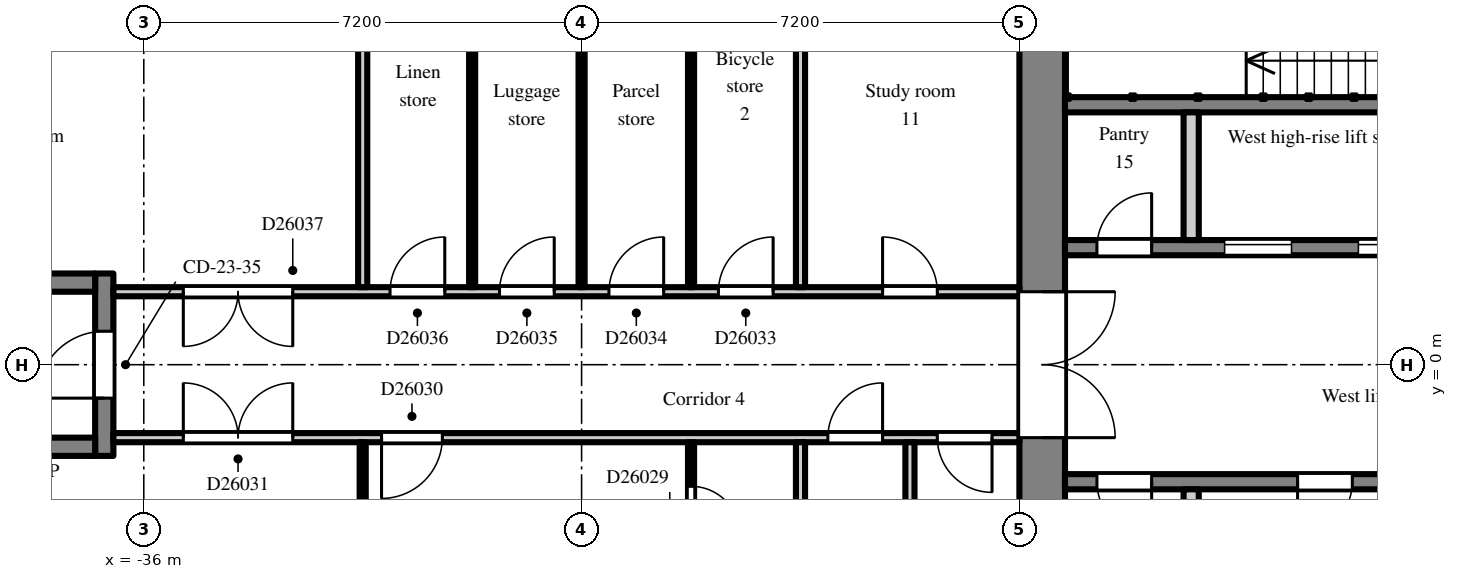
"""IFC4 building model, lengths in metres.
Left out: names, types, materials, properties, quantities, classifications, styles, units other than length and angle.
Written with IfcOpenShell. Run it as: python <this file> out.ifc"""

import sys

from ifc_helpers import new_model, si_unit, direction, frame, frame_2d, origin, place, context, subcontext, project, spatial, rectangle, extrude, element, fill, save


model = new_model("IFC4")
c1 = context("Model", 3, precision=1e-05, world=origin(), true_north=direction((0.0, 1.0)))
c2 = subcontext(c1, "Body", "Model", "MODEL_VIEW")
j1 = project(units=[si_unit("LENGTHUNIT", "METRE"), si_unit("PLANEANGLEUNIT", "RADIAN")], contexts=[c1])
p1 = place(None, origin())
s1 = spatial("IfcSite", under=j1, at=p1, CompositionType="ELEMENT")
p2 = place(p1, origin())
s2 = spatial("IfcBuilding", under=s1, at=p2, CompositionType="ELEMENT")
p3 = place(p2, frame((0.0, 0.0, 179.7)))
s3 = spatial("IfcBuildingStorey", under=s2, at=p3, CompositionType="ELEMENT", Elevation=179.7)
p4 = place(p3, frame((-21.225, -7.2, 0.0), z_axis=(0.0, 0.0, 1.0), x_axis=(0.0, 1.0, 0.0)))
e1 = element("IfcWall", 1, at=p4, inside=s3, PredefinedType="SHEAR", context=c2, shape_type="SweptSolid", body=[
    extrude(rectangle(XDim=14.4, YDim=0.75, at=frame_2d((7.2, 0.0))), origin(), (0.0, 0.0, 1.0), 2.6),
])
p5 = place(p4, frame((6.0, 0.0, 0.0)))
e2 = element("IfcOpeningElement", 2, at=p5, cuts=e1, PredefinedType="OPENING", context=c2, shape_type="SweptSolid", body=[
    extrude(rectangle(XDim=2.4, YDim=2.2, at=frame_2d((1.2, 1.1))), frame((0.0, 0.385, 0.0), z_axis=(0.0, -1.0, 0.0), x_axis=(1.0, 0.0, 0.0)), (0.0, 0.0, 1.0), 0.77),
])
p6 = place(p3, frame((-7.9, 1.925, 0.0), z_axis=(0.0, 0.0, 1.0), x_axis=(-1.0, 0.0, 0.0)))
e3 = element("IfcWall", 3, at=p6, inside=s3, PredefinedType="SHEAR", context=c2, shape_type="SweptSolid", body=[
    extrude(rectangle(XDim=12.95, YDim=0.25, at=frame_2d((6.475, 0.0))), origin(), (0.0, 0.0, 1.0), 2.6),
])
p7 = place(p6, frame((4.825, 0.0, 0.0)))
e4 = element("IfcOpeningElement", 4, at=p7, cuts=e3, PredefinedType="OPENING", context=c2, shape_type="SweptSolid", body=[
    extrude(rectangle(XDim=1.1, YDim=2.1, at=frame_2d((0.55, 1.05))), frame((0.0, 0.135, 0.0), z_axis=(0.0, -1.0, 0.0), x_axis=(1.0, 0.0, 0.0)), (0.0, 0.0, 1.0), 0.27),
])
p8 = place(p6, frame((7.025, 0.0, 0.0)))
e5 = element("IfcOpeningElement", 5, at=p8, cuts=e3, PredefinedType="OPENING", context=c2, shape_type="SweptSolid", body=[
    extrude(rectangle(XDim=1.1, YDim=2.1, at=frame_2d((0.55, 1.05))), frame((0.0, 0.135, 0.0), z_axis=(0.0, -1.0, 0.0), x_axis=(1.0, 0.0, 0.0)), (0.0, 0.0, 1.0), 0.27),
])
p9 = place(p6, frame((9.225, 0.0, 0.0)))
e6 = element("IfcOpeningElement", 6, at=p9, cuts=e3, PredefinedType="OPENING", context=c2, shape_type="SweptSolid", body=[
    extrude(rectangle(XDim=1.1, YDim=2.1, at=frame_2d((0.55, 1.05))), frame((0.0, 0.135, 0.0), z_axis=(0.0, -1.0, 0.0), x_axis=(1.0, 0.0, 0.0)), (0.0, 0.0, 1.0), 0.27),
])
p10 = place(p6, frame((0.525, 0.0, 0.0)))
e7 = element("IfcOpeningElement", 7, at=p10, cuts=e3, PredefinedType="OPENING", context=c2, shape_type="SweptSolid", body=[
    extrude(rectangle(XDim=0.9, YDim=2.1, at=frame_2d((0.45, 1.05))), frame((0.0, 0.135, 0.0), z_axis=(0.0, -1.0, 0.0), x_axis=(1.0, 0.0, 0.0)), (0.0, 0.0, 1.0), 0.27),
])
p11 = place(p6, frame((2.625, 0.0, 0.0)))
e8 = element("IfcOpeningElement", 8, at=p11, cuts=e3, PredefinedType="OPENING", context=c2, shape_type="SweptSolid", body=[
    extrude(rectangle(XDim=1.1, YDim=2.1, at=frame_2d((0.55, 1.05))), frame((0.0, 0.135, 0.0), z_axis=(0.0, -1.0, 0.0), x_axis=(1.0, 0.0, 0.0)), (0.0, 0.0, 1.0), 0.27),
])
p12 = place(p6, frame((11.525, 0.0, 0.0)))
e9 = element("IfcOpeningElement", 9, at=p12, cuts=e3, PredefinedType="OPENING", context=c2, shape_type="SweptSolid", body=[
    extrude(rectangle(XDim=0.9, YDim=2.1, at=frame_2d((0.45, 1.05))), frame((0.0, 0.135, 0.0), z_axis=(0.0, -1.0, 0.0), x_axis=(1.0, 0.0, 0.0)), (0.0, 0.0, 1.0), 0.27),
])
p13 = place(p3, frame((-12.3, 4.275, 0.0), z_axis=(0.0, 0.0, 1.0), x_axis=(-1.0, 0.0, 0.0)))
e10 = element("IfcWall", 10, at=p13, inside=s3, PredefinedType="SHEAR", context=c2, shape_type="SweptSolid", body=[
    extrude(rectangle(XDim=8.55, YDim=0.25, at=frame_2d((4.275, 0.0))), origin(), (0.0, 0.0, 1.0), 2.6),
])
p14 = place(p3, frame((-18.775, 2.05, 0.0), z_axis=(0.0, 0.0, 1.0), x_axis=(0.0, 1.0, 0.0)))
e11 = element("IfcWall", 11, at=p14, inside=s3, PredefinedType="PARTITIONING", context=c2, shape_type="SweptSolid", body=[
    extrude(rectangle(XDim=2.1, YDim=0.25, at=frame_2d((1.05, 0.0))), origin(), (0.0, 0.0, 1.0), 2.6),
])
p15 = place(p3, frame((-7.9, -1.925, 0.0), z_axis=(0.0, 0.0, 1.0), x_axis=(-1.0, 0.0, 0.0)))
e12 = element("IfcWall", 12, at=p15, inside=s3, PredefinedType="SHEAR", context=c2, shape_type="SweptSolid", body=[
    extrude(rectangle(XDim=12.95, YDim=0.25, at=frame_2d((6.475, 0.0))), origin(), (0.0, 0.0, 1.0), 2.6),
])
p16 = place(p15, frame((0.525, 0.0, 0.0)))
e13 = element("IfcOpeningElement", 13, at=p16, cuts=e12, PredefinedType="OPENING", context=c2, shape_type="SweptSolid", body=[
    extrude(rectangle(XDim=0.9, YDim=2.1, at=frame_2d((0.45, 1.05))), frame((0.0, 0.135, 0.0), z_axis=(0.0, -1.0, 0.0), x_axis=(1.0, 0.0, 0.0)), (0.0, 0.0, 1.0), 0.27),
])
p17 = place(p15, frame((2.625, 0.0, 0.0)))
e14 = element("IfcOpeningElement", 14, at=p17, cuts=e12, PredefinedType="OPENING", context=c2, shape_type="SweptSolid", body=[
    extrude(rectangle(XDim=1.1, YDim=2.1, at=frame_2d((0.55, 1.05))), frame((0.0, 0.135, 0.0), z_axis=(0.0, -1.0, 0.0), x_axis=(1.0, 0.0, 0.0)), (0.0, 0.0, 1.0), 0.27),
])
p18 = place(p15, frame((4.925, 0.0, 0.0)))
e15 = element("IfcOpeningElement", 15, at=p18, cuts=e12, PredefinedType="OPENING", context=c2, shape_type="SweptSolid", body=[
    extrude(rectangle(XDim=0.9, YDim=2.1, at=frame_2d((0.45, 1.05))), frame((0.0, 0.135, 0.0), z_axis=(0.0, -1.0, 0.0), x_axis=(1.0, 0.0, 0.0)), (0.0, 0.0, 1.0), 0.27),
])
p19 = place(p15, frame((8.225, 0.0, 0.0)))
e16 = element("IfcOpeningElement", 16, at=p19, cuts=e12, PredefinedType="OPENING", context=c2, shape_type="SweptSolid", body=[
    extrude(rectangle(XDim=0.9, YDim=2.1, at=frame_2d((0.45, 1.05))), frame((0.0, 0.135, 0.0), z_axis=(0.0, -1.0, 0.0), x_axis=(1.0, 0.0, 0.0)), (0.0, 0.0, 1.0), 0.27),
])
p20 = place(p15, frame((11.525, 0.0, 0.0)))
e17 = element("IfcOpeningElement", 17, at=p20, cuts=e12, PredefinedType="OPENING", context=c2, shape_type="SweptSolid", body=[
    extrude(rectangle(XDim=0.9, YDim=2.1, at=frame_2d((0.45, 1.05))), frame((0.0, 0.135, 0.0), z_axis=(0.0, -1.0, 0.0), x_axis=(1.0, 0.0, 0.0)), (0.0, 0.0, 1.0), 0.27),
])
p21 = place(p3, frame((-18.775, -2.05, 0.0), z_axis=(0.0, 0.0, 1.0), x_axis=(0.0, -1.0, 0.0)))
e18 = element("IfcWall", 18, at=p21, inside=s3, PredefinedType="PARTITIONING", context=c2, shape_type="SweptSolid", body=[
    extrude(rectangle(XDim=2.1, YDim=0.25, at=frame_2d((1.05, 0.0))), origin(), (0.0, 0.0, 1.0), 2.6),
])
p22 = place(p3, frame((-36.65, -1.5, 0.0), z_axis=(0.0, 0.0, 1.0), x_axis=(0.0, 1.0, 0.0)))
e19 = element("IfcWall", 19, at=p22, inside=s3, PredefinedType="SHEAR", context=c2, shape_type="SweptSolid", body=[
    extrude(rectangle(XDim=3.0, YDim=0.3, at=frame_2d((1.5, 0.0))), origin(), (0.0, 0.0, 1.0), 2.6),
])
p23 = place(p22, frame((0.95, 0.0, 0.0)))
e20 = element("IfcOpeningElement", 20, at=p23, cuts=e19, PredefinedType="OPENING", context=c2, shape_type="SweptSolid", body=[
    extrude(rectangle(XDim=1.1, YDim=2.1, at=frame_2d((0.55, 1.05))), frame((0.0, 0.16, 0.0), z_axis=(0.0, -1.0, 0.0), x_axis=(1.0, 0.0, 0.0)), (0.0, 0.0, 1.0), 0.32),
])
for number, where, z_axis, x_axis in (
    (21, (-36.8, -1.35, 0.0), (0.0, 0.0, 1.0), (-1.0, 0.0, 0.0)),
    (22, (-36.8, 1.35, 0.0), (0.0, 0.0, 1.0), (-1.0, 0.0, 0.0)),
):
    element("IfcWall", number, at=place(p3, frame(where, z_axis=z_axis, x_axis=x_axis)), inside=s3, PredefinedType="SHEAR", context=c2, shape_type="SweptSolid", body=[
        extrude(rectangle(XDim=5.8, YDim=0.3, at=frame_2d((2.9, 0.0))), origin(), (0.0, 0.0, 1.0), 2.6),
    ])
p24 = place(p3, frame((-36.5, -1.2, 0.0), z_axis=(0.0, 0.0, 1.0), x_axis=(1.0, 0.0, 0.0)))
e23 = element("IfcWall", 23, at=p24, inside=s3, PredefinedType="PARTITIONING", context=c2, shape_type="SweptSolid", body=[
    extrude(rectangle(XDim=14.9, YDim=0.15, at=frame_2d((7.45, 0.0))), origin(), (0.0, 0.0, 1.0), 2.6),
])
p25 = place(p24, frame((13.55, 0.0, 0.0)))
e24 = element("IfcOpeningElement", 24, at=p25, cuts=e23, PredefinedType="OPENING", context=c2, shape_type="SweptSolid", body=[
    extrude(rectangle(XDim=0.9, YDim=2.1, at=frame_2d((0.45, 1.05))), frame((0.0, 0.085, 0.0), z_axis=(0.0, -1.0, 0.0), x_axis=(1.0, 0.0, 0.0)), (0.0, 0.0, 1.0), 0.17),
])
p26 = place(p24, frame((11.75, 0.0, 0.0)))
e25 = element("IfcOpeningElement", 25, at=p26, cuts=e23, PredefinedType="OPENING", context=c2, shape_type="SweptSolid", body=[
    extrude(rectangle(XDim=0.9, YDim=2.1, at=frame_2d((0.45, 1.05))), frame((0.0, 0.085, 0.0), z_axis=(0.0, -1.0, 0.0), x_axis=(1.0, 0.0, 0.0)), (0.0, 0.0, 1.0), 0.17),
])
p27 = place(p24, frame((4.41, 0.0, 0.0)))
e26 = element("IfcOpeningElement", 26, at=p27, cuts=e23, PredefinedType="OPENING", context=c2, shape_type="SweptSolid", body=[
    extrude(rectangle(XDim=1.0, YDim=2.1, at=frame_2d((0.5, 1.05))), frame((0.0, 0.085, 0.0), z_axis=(0.0, -1.0, 0.0), x_axis=(1.0, 0.0, 0.0)), (0.0, 0.0, 1.0), 0.17),
])
p28 = place(p24, frame((1.15, 0.0, 0.0)))
e27 = element("IfcOpeningElement", 27, at=p28, cuts=e23, PredefinedType="OPENING", context=c2, shape_type="SweptSolid", body=[
    extrude(rectangle(XDim=1.8, YDim=2.1, at=frame_2d((0.9, 1.05))), frame((0.0, 0.085, 0.0), z_axis=(0.0, -1.0, 0.0), x_axis=(1.0, 0.0, 0.0)), (0.0, 0.0, 1.0), 0.17),
])
p29 = place(p3, frame((-36.5, 1.2, 0.0), z_axis=(0.0, 0.0, 1.0), x_axis=(1.0, 0.0, 0.0)))
e28 = element("IfcWall", 28, at=p29, inside=s3, PredefinedType="PARTITIONING", context=c2, shape_type="SweptSolid", body=[
    extrude(rectangle(XDim=14.9, YDim=0.15, at=frame_2d((7.45, 0.0))), origin(), (0.0, 0.0, 1.0), 2.6),
])
p30 = place(p29, frame((12.65, 0.0, 0.0)))
e29 = element("IfcOpeningElement", 29, at=p30, cuts=e28, PredefinedType="OPENING", context=c2, shape_type="SweptSolid", body=[
    extrude(rectangle(XDim=0.9, YDim=2.1, at=frame_2d((0.45, 1.05))), frame((0.0, 0.085, 0.0), z_axis=(0.0, -1.0, 0.0), x_axis=(1.0, 0.0, 0.0)), (0.0, 0.0, 1.0), 0.17),
])
p31 = place(p29, frame((9.95, 0.0, 0.0)))
e30 = element("IfcOpeningElement", 30, at=p31, cuts=e28, PredefinedType="OPENING", context=c2, shape_type="SweptSolid", body=[
    extrude(rectangle(XDim=0.9, YDim=2.1, at=frame_2d((0.45, 1.05))), frame((0.0, 0.085, 0.0), z_axis=(0.0, -1.0, 0.0), x_axis=(1.0, 0.0, 0.0)), (0.0, 0.0, 1.0), 0.17),
])
p32 = place(p29, frame((8.15, 0.0, 0.0)))
e31 = element("IfcOpeningElement", 31, at=p32, cuts=e28, PredefinedType="OPENING", context=c2, shape_type="SweptSolid", body=[
    extrude(rectangle(XDim=0.9, YDim=2.1, at=frame_2d((0.45, 1.05))), frame((0.0, 0.085, 0.0), z_axis=(0.0, -1.0, 0.0), x_axis=(1.0, 0.0, 0.0)), (0.0, 0.0, 1.0), 0.17),
])
p33 = place(p29, frame((6.35, 0.0, 0.0)))
e32 = element("IfcOpeningElement", 32, at=p33, cuts=e28, PredefinedType="OPENING", context=c2, shape_type="SweptSolid", body=[
    extrude(rectangle(XDim=0.9, YDim=2.1, at=frame_2d((0.45, 1.05))), frame((0.0, 0.085, 0.0), z_axis=(0.0, -1.0, 0.0), x_axis=(1.0, 0.0, 0.0)), (0.0, 0.0, 1.0), 0.17),
])
p34 = place(p29, frame((4.55, 0.0, 0.0)))
e33 = element("IfcOpeningElement", 33, at=p34, cuts=e28, PredefinedType="OPENING", context=c2, shape_type="SweptSolid", body=[
    extrude(rectangle(XDim=0.9, YDim=2.1, at=frame_2d((0.45, 1.05))), frame((0.0, 0.085, 0.0), z_axis=(0.0, -1.0, 0.0), x_axis=(1.0, 0.0, 0.0)), (0.0, 0.0, 1.0), 0.17),
])
p35 = place(p29, frame((1.15, 0.0, 0.0)))
e34 = element("IfcOpeningElement", 34, at=p35, cuts=e28, PredefinedType="OPENING", context=c2, shape_type="SweptSolid", body=[
    extrude(rectangle(XDim=1.8, YDim=2.1, at=frame_2d((0.9, 1.05))), frame((0.0, 0.085, 0.0), z_axis=(0.0, -1.0, 0.0), x_axis=(1.0, 0.0, 0.0)), (0.0, 0.0, 1.0), 0.17),
])
p36 = place(p3, frame((-32.4, -6.9, 0.0), z_axis=(0.0, 0.0, 1.0), x_axis=(0.0, 1.0, 0.0)))
e35 = element("IfcWall", 35, at=p36, inside=s3, PredefinedType="PARTITIONING", context=c2, shape_type="SweptSolid", body=[
    extrude(rectangle(XDim=5.625, YDim=0.1, at=frame_2d((2.812, 0.0))), origin(), (0.0, 0.0, 1.0), 2.6),
])
p37 = place(p3, frame((-32.4, 1.275, 0.0), z_axis=(0.0, 0.0, 1.0), x_axis=(0.0, 1.0, 0.0)))
e36 = element("IfcWall", 36, at=p37, inside=s3, PredefinedType="PARTITIONING", context=c2, shape_type="SweptSolid", body=[
    extrude(rectangle(XDim=5.625, YDim=0.15, at=frame_2d((2.812, 0.0))), origin(), (0.0, 0.0, 1.0), 2.6),
])
for number, where, z_axis, x_axis in (
    (37, (-30.6, 1.275, 0.0), (0.0, 0.0, 1.0), (0.0, 1.0, 0.0)),
    (38, (-28.8, 1.275, 0.0), (0.0, 0.0, 1.0), (0.0, 1.0, 0.0)),
):
    element("IfcWall", number, at=place(p3, frame(where, z_axis=z_axis, x_axis=x_axis)), inside=s3, PredefinedType="PARTITIONING", context=c2, shape_type="SweptSolid", body=[
        extrude(rectangle(XDim=5.625, YDim=0.1, at=frame_2d((2.812, 0.0))), origin(), (0.0, 0.0, 1.0), 2.6),
    ])
p38 = place(p3, frame((-27.0, -3.65, 0.0), z_axis=(0.0, 0.0, 1.0), x_axis=(0.0, 1.0, 0.0)))
e39 = element("IfcWall", 39, at=p38, inside=s3, PredefinedType="PARTITIONING", context=c2, shape_type="SweptSolid", body=[
    extrude(rectangle(XDim=2.375, YDim=0.1, at=frame_2d((1.188, 0.0))), origin(), (0.0, 0.0, 1.0), 2.6),
])
p39 = place(p38, frame((0.85, 0.0, 0.0)))
e40 = element("IfcOpeningElement", 40, at=p39, cuts=e39, PredefinedType="OPENING", context=c2, shape_type="SweptSolid", body=[
    extrude(rectangle(XDim=0.8, YDim=2.1, at=frame_2d((0.4, 1.05))), frame((0.0, 0.06, 0.0), z_axis=(0.0, -1.0, 0.0), x_axis=(1.0, 0.0, 0.0)), (0.0, 0.0, 1.0), 0.12),
])
p40 = place(p3, frame((-27.0, 1.275, 0.0), z_axis=(0.0, 0.0, 1.0), x_axis=(0.0, 1.0, 0.0)))
e41 = element("IfcWall", 41, at=p40, inside=s3, PredefinedType="PARTITIONING", context=c2, shape_type="SweptSolid", body=[
    extrude(rectangle(XDim=5.625, YDim=0.1, at=frame_2d((2.812, 0.0))), origin(), (0.0, 0.0, 1.0), 2.6),
])
for number, where, z_axis, x_axis in (
    (42, (-25.2, -6.9, 0.0), (0.0, 0.0, 1.0), (0.0, 1.0, 0.0)),
    (43, (-25.2, 1.275, 0.0), (0.0, 0.0, 1.0), (0.0, 1.0, 0.0)),
    (44, (-23.4, -6.9, 0.0), (0.0, 0.0, 1.0), (0.0, 1.0, 0.0)),
):
    element("IfcWall", number, at=place(p3, frame(where, z_axis=z_axis, x_axis=x_axis)), inside=s3, PredefinedType="PARTITIONING", context=c2, shape_type="SweptSolid", body=[
        extrude(rectangle(XDim=5.625, YDim=0.15, at=frame_2d((2.812, 0.0))), origin(), (0.0, 0.0, 1.0), 2.6),
    ])
p41 = place(p8, origin())
e45 = element("IfcDoor", 45, at=p41, inside=s3, OperationType="SLIDING_TO_LEFT", PredefinedType="DOOR", context=c2, shape_type="SweptSolid", body=[
    extrude(rectangle(XDim=1.1, YDim=2.1, at=frame_2d((0.55, 1.05))), frame((0.0, 0.025, 0.0), z_axis=(0.0, -1.0, 0.0), x_axis=(1.0, 0.0, 0.0)), (0.0, 0.0, 1.0), 0.05),
])
fill(e5, e45)
p42 = place(p9, origin())
e46 = element("IfcDoor", 46, at=p42, inside=s3, OperationType="SLIDING_TO_LEFT", PredefinedType="DOOR", context=c2, shape_type="SweptSolid", body=[
    extrude(rectangle(XDim=1.1, YDim=2.1, at=frame_2d((0.55, 1.05))), frame((0.0, 0.025, 0.0), z_axis=(0.0, -1.0, 0.0), x_axis=(1.0, 0.0, 0.0)), (0.0, 0.0, 1.0), 0.05),
])
fill(e6, e46)
p43 = place(p5, frame((2.4, 0.0, 0.0), z_axis=(0.0, 0.0, 1.0), x_axis=(-1.0, 0.0, 0.0)))
e47 = element("IfcDoor", 47, at=p43, inside=s3, OperationType="DOUBLE_DOOR_DOUBLE_SWING", PredefinedType="DOOR", context=c2, shape_type="SweptSolid", body=[
    extrude(rectangle(XDim=2.4, YDim=2.2, at=frame_2d((1.2, 1.1))), frame((0.0, 0.025, 0.0), z_axis=(0.0, -1.0, 0.0), x_axis=(1.0, 0.0, 0.0)), (0.0, 0.0, 1.0), 0.05),
])
fill(e2, e47)
p44 = place(p12, frame((0.9, 0.0, 0.0), z_axis=(0.0, 0.0, 1.0), x_axis=(-1.0, 0.0, 0.0)))
e48 = element("IfcDoor", 48, at=p44, inside=s3, OperationType="SINGLE_SWING_RIGHT", PredefinedType="DOOR", context=c2, shape_type="SweptSolid", body=[
    extrude(rectangle(XDim=0.9, YDim=2.1, at=frame_2d((0.45, 1.05))), frame((0.0, 0.025, 0.0), z_axis=(0.0, -1.0, 0.0), x_axis=(1.0, 0.0, 0.0)), (0.0, 0.0, 1.0), 0.05),
])
fill(e9, e48)
p45 = place(p19, origin())
e49 = element("IfcDoor", 49, at=p45, inside=s3, OperationType="SINGLE_SWING_RIGHT", PredefinedType="DOOR", context=c2, shape_type="SweptSolid", body=[
    extrude(rectangle(XDim=0.9, YDim=2.1, at=frame_2d((0.45, 1.05))), frame((0.0, 0.025, 0.0), z_axis=(0.0, -1.0, 0.0), x_axis=(1.0, 0.0, 0.0)), (0.0, 0.0, 1.0), 0.05),
])
fill(e16, e49)
p46 = place(p20, origin())
e50 = element("IfcDoor", 50, at=p46, inside=s3, OperationType="SINGLE_SWING_LEFT", PredefinedType="DOOR", context=c2, shape_type="SweptSolid", body=[
    extrude(rectangle(XDim=0.9, YDim=2.1, at=frame_2d((0.45, 1.05))), frame((0.0, 0.025, 0.0), z_axis=(0.0, -1.0, 0.0), x_axis=(1.0, 0.0, 0.0)), (0.0, 0.0, 1.0), 0.05),
])
fill(e17, e50)
p47 = place(p23, origin())
e51 = element("IfcDoor", 51, at=p47, inside=s3, OperationType="SINGLE_SWING_LEFT", PredefinedType="DOOR", context=c2, shape_type="SweptSolid", body=[
    extrude(rectangle(XDim=1.1, YDim=2.1, at=frame_2d((0.55, 1.05))), frame((0.0, 0.025, 0.0), z_axis=(0.0, -1.0, 0.0), x_axis=(1.0, 0.0, 0.0)), (0.0, 0.0, 1.0), 0.05),
])
fill(e20, e51)
p48 = place(p25, frame((0.9, 0.0, 0.0), z_axis=(0.0, 0.0, 1.0), x_axis=(-1.0, 0.0, 0.0)))
e52 = element("IfcDoor", 52, at=p48, inside=s3, OperationType="SINGLE_SWING_LEFT", PredefinedType="DOOR", context=c2, shape_type="SweptSolid", body=[
    extrude(rectangle(XDim=0.9, YDim=2.1, at=frame_2d((0.45, 1.05))), frame((0.0, 0.025, 0.0), z_axis=(0.0, -1.0, 0.0), x_axis=(1.0, 0.0, 0.0)), (0.0, 0.0, 1.0), 0.05),
])
fill(e24, e52)
p49 = place(p26, origin())
e53 = element("IfcDoor", 53, at=p49, inside=s3, OperationType="SINGLE_SWING_RIGHT", PredefinedType="DOOR", context=c2, shape_type="SweptSolid", body=[
    extrude(rectangle(XDim=0.9, YDim=2.1, at=frame_2d((0.45, 1.05))), frame((0.0, 0.025, 0.0), z_axis=(0.0, -1.0, 0.0), x_axis=(1.0, 0.0, 0.0)), (0.0, 0.0, 1.0), 0.05),
])
fill(e25, e53)
p50 = place(p39, frame((0.8, 0.0, 0.0), z_axis=(0.0, 0.0, 1.0), x_axis=(-1.0, 0.0, 0.0)))
e54 = element("IfcDoor", 54, at=p50, inside=s3, OperationType="SINGLE_SWING_RIGHT", PredefinedType="DOOR", context=c2, shape_type="SweptSolid", body=[
    extrude(rectangle(XDim=0.8, YDim=2.1, at=frame_2d((0.4, 1.05))), frame((0.0, 0.025, 0.0), z_axis=(0.0, -1.0, 0.0), x_axis=(1.0, 0.0, 0.0)), (0.0, 0.0, 1.0), 0.05),
])
fill(e40, e54)
p51 = place(p27, frame((1.0, 0.0, 0.0), z_axis=(0.0, 0.0, 1.0), x_axis=(-1.0, 0.0, 0.0)))
e55 = element("IfcDoor", 55, at=p51, inside=s3, OperationType="SINGLE_SWING_RIGHT", PredefinedType="DOOR", context=c2, shape_type="SweptSolid", body=[
    extrude(rectangle(XDim=1.0, YDim=2.1, at=frame_2d((0.5, 1.05))), frame((0.0, 0.025, 0.0), z_axis=(0.0, -1.0, 0.0), x_axis=(1.0, 0.0, 0.0)), (0.0, 0.0, 1.0), 0.05),
])
fill(e26, e55)
p52 = place(p28, origin())
e56 = element("IfcDoor", 56, at=p52, inside=s3, OperationType="DOUBLE_DOOR_DOUBLE_SWING", PredefinedType="DOOR", context=c2, shape_type="SweptSolid", body=[
    extrude(rectangle(XDim=1.8, YDim=2.1, at=frame_2d((0.9, 1.05))), frame((0.0, 0.025, 0.0), z_axis=(0.0, -1.0, 0.0), x_axis=(1.0, 0.0, 0.0)), (0.0, 0.0, 1.0), 0.05),
])
fill(e27, e56)
p53 = place(p30, origin())
e57 = element("IfcDoor", 57, at=p53, inside=s3, OperationType="SINGLE_SWING_LEFT", PredefinedType="DOOR", context=c2, shape_type="SweptSolid", body=[
    extrude(rectangle(XDim=0.9, YDim=2.1, at=frame_2d((0.45, 1.05))), frame((0.0, 0.025, 0.0), z_axis=(0.0, -1.0, 0.0), x_axis=(1.0, 0.0, 0.0)), (0.0, 0.0, 1.0), 0.05),
])
fill(e29, e57)
p54 = place(p31, origin())
e58 = element("IfcDoor", 58, at=p54, inside=s3, OperationType="SINGLE_SWING_RIGHT", PredefinedType="DOOR", context=c2, shape_type="SweptSolid", body=[
    extrude(rectangle(XDim=0.9, YDim=2.1, at=frame_2d((0.45, 1.05))), frame((0.0, 0.025, 0.0), z_axis=(0.0, -1.0, 0.0), x_axis=(1.0, 0.0, 0.0)), (0.0, 0.0, 1.0), 0.05),
])
fill(e30, e58)
p55 = place(p32, origin())
e59 = element("IfcDoor", 59, at=p55, inside=s3, OperationType="SINGLE_SWING_RIGHT", PredefinedType="DOOR", context=c2, shape_type="SweptSolid", body=[
    extrude(rectangle(XDim=0.9, YDim=2.1, at=frame_2d((0.45, 1.05))), frame((0.0, 0.025, 0.0), z_axis=(0.0, -1.0, 0.0), x_axis=(1.0, 0.0, 0.0)), (0.0, 0.0, 1.0), 0.05),
])
fill(e31, e59)
p56 = place(p33, origin())
e60 = element("IfcDoor", 60, at=p56, inside=s3, OperationType="SINGLE_SWING_RIGHT", PredefinedType="DOOR", context=c2, shape_type="SweptSolid", body=[
    extrude(rectangle(XDim=0.9, YDim=2.1, at=frame_2d((0.45, 1.05))), frame((0.0, 0.025, 0.0), z_axis=(0.0, -1.0, 0.0), x_axis=(1.0, 0.0, 0.0)), (0.0, 0.0, 1.0), 0.05),
])
fill(e32, e60)
p57 = place(p34, origin())
e61 = element("IfcDoor", 61, at=p57, inside=s3, OperationType="SINGLE_SWING_RIGHT", PredefinedType="DOOR", context=c2, shape_type="SweptSolid", body=[
    extrude(rectangle(XDim=0.9, YDim=2.1, at=frame_2d((0.45, 1.05))), frame((0.0, 0.025, 0.0), z_axis=(0.0, -1.0, 0.0), x_axis=(1.0, 0.0, 0.0)), (0.0, 0.0, 1.0), 0.05),
])
fill(e33, e61)
p58 = place(p35, frame((1.8, 0.0, 0.0), z_axis=(0.0, 0.0, 1.0), x_axis=(-1.0, 0.0, 0.0)))
e62 = element("IfcDoor", 62, at=p58, inside=s3, OperationType="DOUBLE_DOOR_DOUBLE_SWING", PredefinedType="DOOR", context=c2, shape_type="SweptSolid", body=[
    extrude(rectangle(XDim=1.8, YDim=2.1, at=frame_2d((0.9, 1.05))), frame((0.0, 0.025, 0.0), z_axis=(0.0, -1.0, 0.0), x_axis=(1.0, 0.0, 0.0)), (0.0, 0.0, 1.0), 0.05),
])
fill(e34, e62)
save(model, sys.argv[1])
